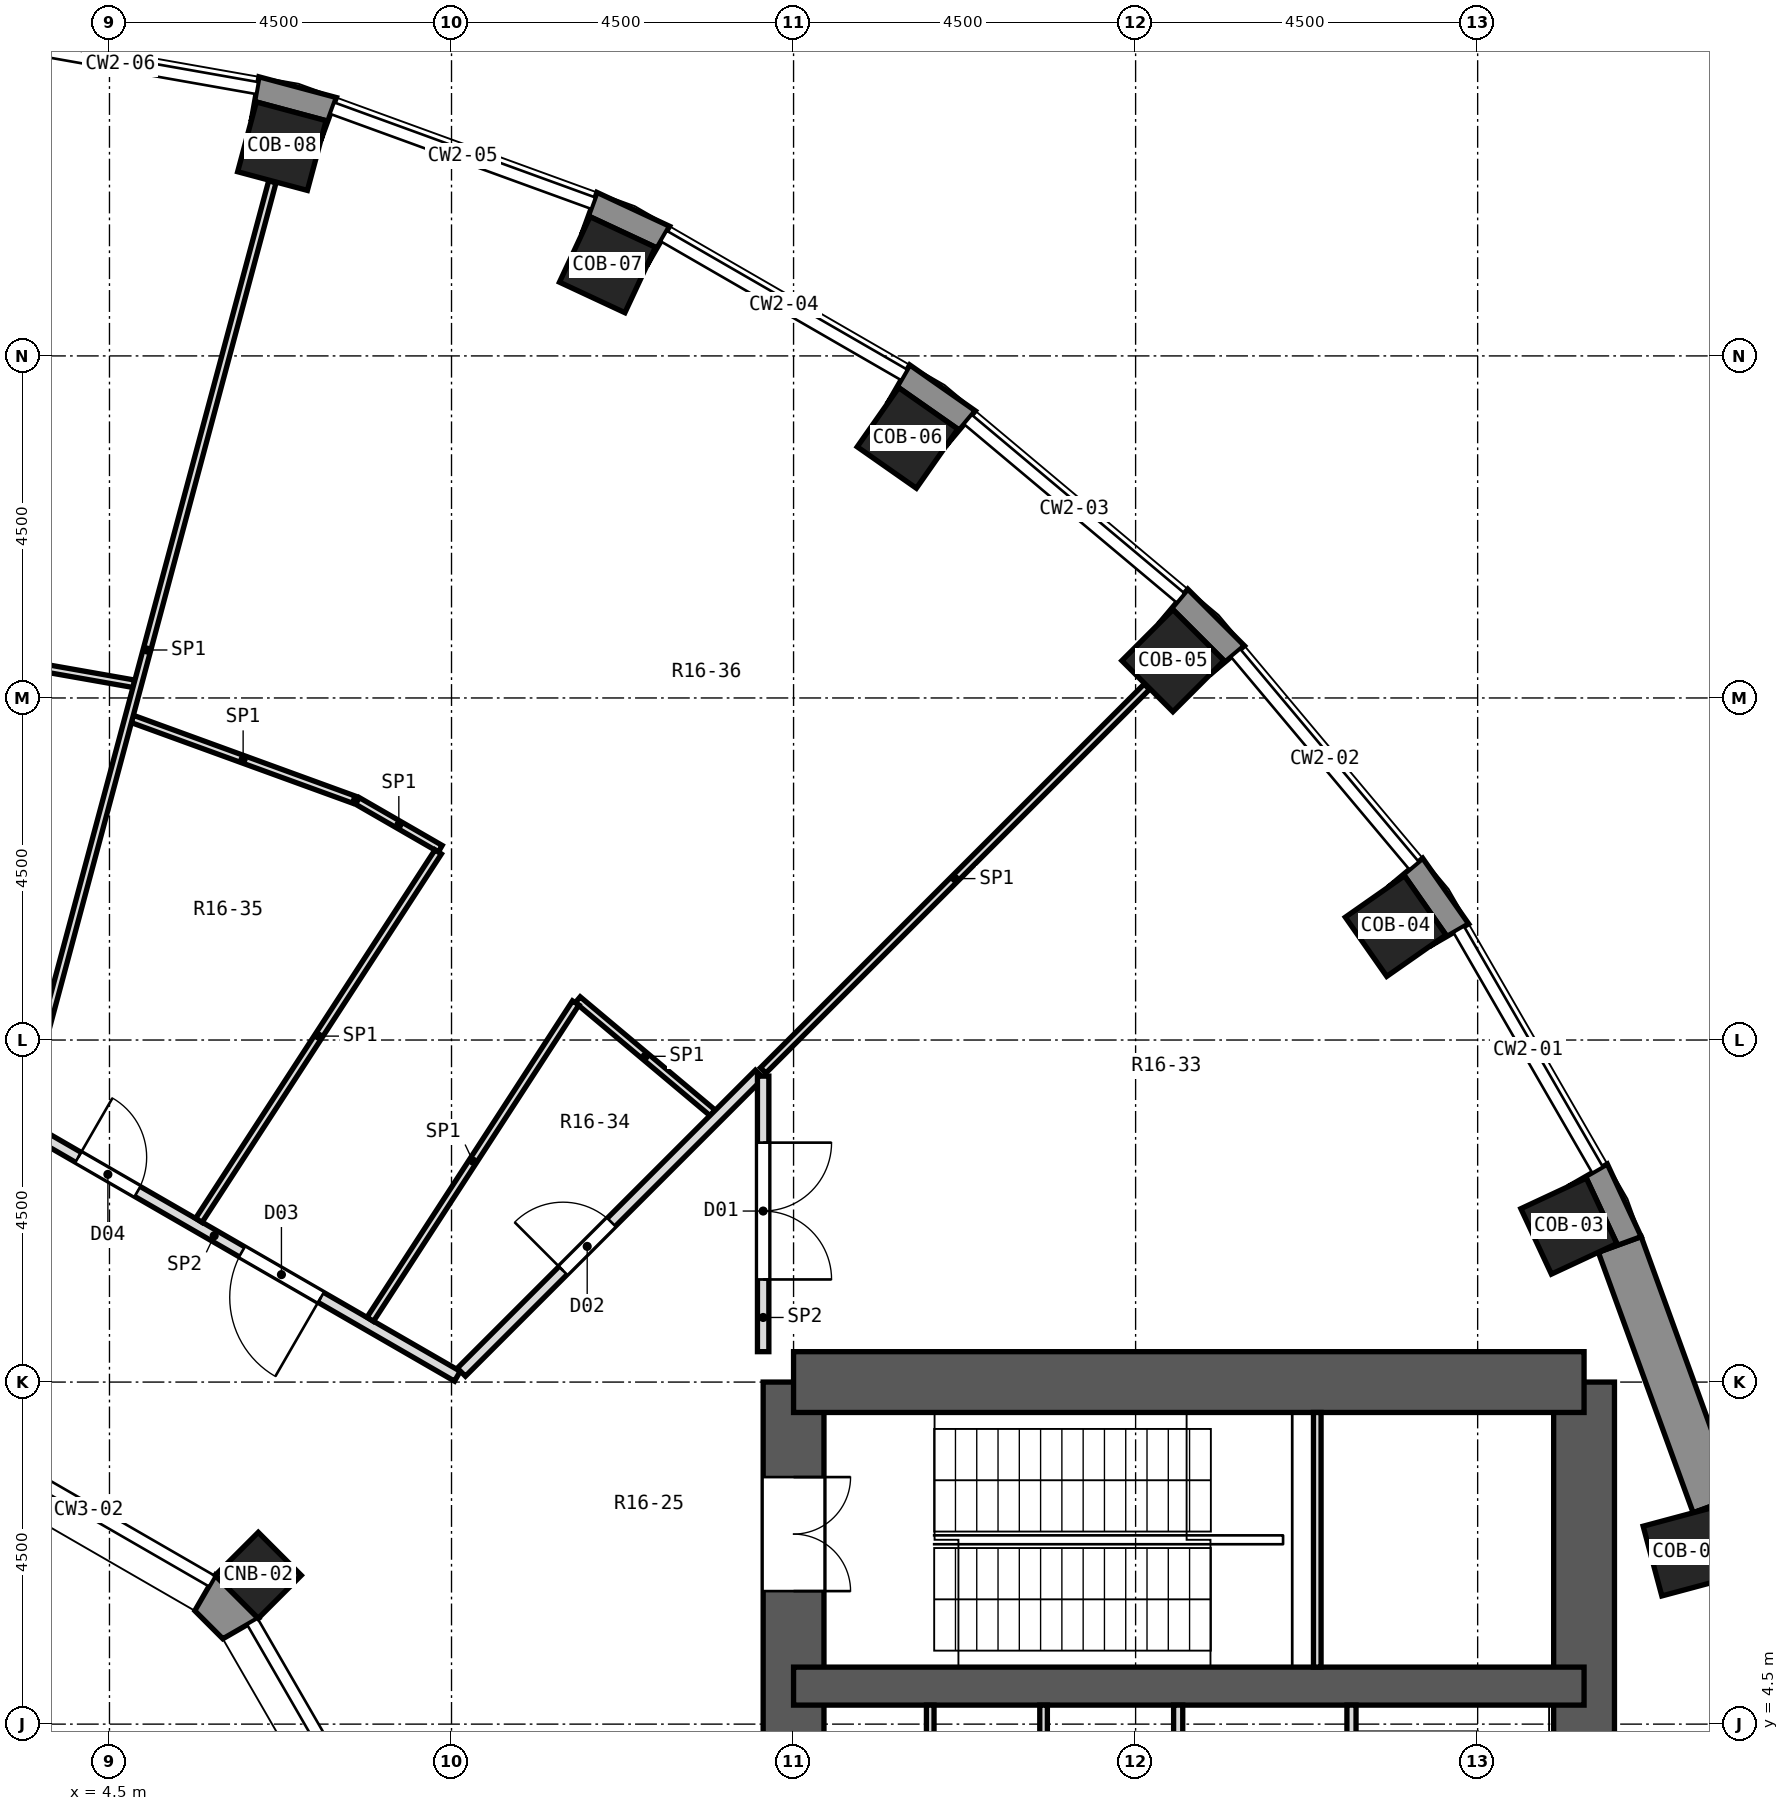
"""IFC4 building model, lengths in metres.
Left out: names, types, materials, properties, quantities, classifications, styles, units other than length and angle.
Written with IfcOpenShell. Run it as: python <this file> out.ifc"""

import sys

from ifc_helpers import new_model, si_unit, direction, frame, frame_2d, origin, origin_2d, place, context, subcontext, project, spatial, polyline, rectangle, outline, extrude, element, fill, save


model = new_model("IFC4")
c1 = context("Model", 3, precision=1e-05, world=origin(), true_north=direction((0.0, 1.0)))
c2 = subcontext(c1, "Body", "Model", "MODEL_VIEW")
j1 = project(units=[si_unit("LENGTHUNIT", "METRE"), si_unit("PLANEANGLEUNIT", "RADIAN")], contexts=[c1])
p1 = place(None, origin())
s1 = spatial("IfcSite", under=j1, at=p1, CompositionType="ELEMENT")
p2 = place(p1, origin())
s2 = spatial("IfcBuilding", under=s1, at=p2, CompositionType="ELEMENT")
p3 = place(p2, frame((0.0, 0.0, 86.9)))
s3 = spatial("IfcBuildingStorey", under=s2, at=p3, CompositionType="ELEMENT", Elevation=86.9)
for number, where, z_axis, x_axis in (
    (1, (25.259, 6.768, -0.55), (0.0, 0.0, 1.0), (0.966, 0.259, 0.0)),
    (2, (23.7, 11.052, -0.55), (0.0, 0.0, 1.0), (0.906, 0.423, 0.0)),
    (3, (21.421, 14.999, -0.55), (0.0, 0.0, 1.0), (0.819, 0.574, 0.0)),
    (4, (18.491, 18.491, -0.55), (0.0, 0.0, 1.0), (0.707, 0.707, 0.0)),
    (5, (14.999, 21.421, -0.55), (0.0, 0.0, 1.0), (0.574, 0.819, 0.0)),
    (6, (11.052, 23.7, -0.55), (0.0, 0.0, 1.0), (0.423, 0.906, 0.0)),
    (7, (6.768, 25.259, -0.55), (0.0, 0.0, 1.0), (0.259, 0.966, 0.0)),
):
    element("IfcColumn", number, at=place(p3, frame(where, z_axis=z_axis, x_axis=x_axis)), inside=s3, PredefinedType="COLUMN", context=c2, shape_type="SweptSolid", body=[
        extrude(rectangle(XDim=0.95, YDim=0.95, at=origin_2d()), origin(), (0.0, 0.0, 1.0), 5.55),
    ])
p4 = place(p3, frame((6.458, 6.458, 0.0), z_axis=(0.0, 0.0, 1.0), x_axis=(0.707106781187, 0.707106781187, 0.0)))
e8 = element("IfcColumn", 8, at=p4, inside=s3, PredefinedType="COLUMN", context=c2, shape_type="SweptSolid", body=[
    extrude(rectangle(XDim=0.8, YDim=0.8, at=origin_2d()), origin(), (0.0, 0.0, 1.0), 5.0),
])
p5 = place(p3, frame((13.5, -9.0, 0.0), z_axis=(0.0, 0.0, 1.0), x_axis=(0.0, 1.0, 0.0)))
e9 = element("IfcWall", 9, at=p5, inside=s3, PredefinedType="SHEAR", context=c2, shape_type="SweptSolid", body=[
    extrude(rectangle(XDim=18.0, YDim=0.8, at=frame_2d((9.0, 0.0))), origin(), (0.0, 0.0, 1.0), 5.0),
])
p6 = place(p5, frame((15.25, 0.0, 0.0)))
e10 = element("IfcOpeningElement", 10, at=p6, cuts=e9, PredefinedType="OPENING", context=c2, shape_type="SweptSolid", body=[
    extrude(rectangle(XDim=1.5, YDim=2.1, at=frame_2d((0.75, 1.05))), frame((0.0, 0.412, 0.0), z_axis=(0.0, -1.0, 0.0), x_axis=(1.0, 0.0, 0.0)), (0.0, 0.0, 1.0), 0.824),
])
p7 = place(p5, frame((1.25, 0.0, 0.0)))
e11 = element("IfcOpeningElement", 11, at=p7, cuts=e9, PredefinedType="OPENING", context=c2, shape_type="SweptSolid", body=[
    extrude(rectangle(XDim=1.5, YDim=2.1, at=frame_2d((0.75, 1.05))), frame((0.0, 0.412, 0.0), z_axis=(0.0, -1.0, 0.0), x_axis=(1.0, 0.0, 0.0)), (0.0, 0.0, 1.0), 0.824),
])
p8 = place(p5, frame((7.5, 0.0, 0.0)))
e12 = element("IfcOpeningElement", 12, at=p8, cuts=e9, PredefinedType="OPENING", context=c2, shape_type="SweptSolid", body=[
    extrude(rectangle(XDim=3.0, YDim=2.4, at=frame_2d((1.5, 1.2))), frame((0.0, 0.412, 0.0), z_axis=(0.0, -1.0, 0.0), x_axis=(1.0, 0.0, 0.0)), (0.0, 0.0, 1.0), 0.824),
])
p9 = place(p3, frame((23.9, -9.0, 0.0), z_axis=(0.0, 0.0, 1.0), x_axis=(0.0, 1.0, 0.0)))
e13 = element("IfcWall", 13, at=p9, inside=s3, PredefinedType="SHEAR", context=c2, shape_type="SweptSolid", body=[
    extrude(rectangle(XDim=18.0, YDim=0.8, at=frame_2d((9.0, 0.0))), origin(), (0.0, 0.0, 1.0), 5.0),
])
p10 = place(p3, frame((13.5, 9.0, 0.0), z_axis=(0.0, 0.0, 1.0), x_axis=(1.0, 0.0, 0.0)))
e14 = element("IfcWall", 14, at=p10, inside=s3, PredefinedType="SHEAR", context=c2, shape_type="SweptSolid", body=[
    extrude(rectangle(XDim=10.4, YDim=0.8, at=frame_2d((5.2, 0.0))), origin(), (0.0, 0.0, 1.0), 5.0),
])
p11 = place(p3, frame((13.5, 5.0, 0.0), z_axis=(0.0, 0.0, 1.0), x_axis=(1.0, 0.0, 0.0)))
e15 = element("IfcWall", 15, at=p11, inside=s3, PredefinedType="SHEAR", context=c2, shape_type="SweptSolid", body=[
    extrude(rectangle(XDim=10.4, YDim=0.5, at=frame_2d((5.2, 0.0))), origin(), (0.0, 0.0, 1.0), 5.0),
])
p12 = place(p3, frame((25.617, 7.383, 0.0), z_axis=(0.0, 0.0, 1.0), x_axis=(-0.341990236633, 0.939703505393, 0.0)))
e16 = element("IfcWall", 16, at=p12, inside=s3, PredefinedType="SOLIDWALL", context=c2, shape_type="SweptSolid", body=[
    extrude(rectangle(XDim=3.648, YDim=0.6, at=frame_2d((1.824, 0.0))), origin(), (0.0, 0.0, 1.0), 4.5),
])
p13 = place(p3, origin())
e17 = element("IfcWall", 17, at=p13, inside=s3, PredefinedType="SOLIDWALL", context=c2, shape_type="SweptSolid", body=[
    extrude(outline(polyline([(26.172, 6.467), (25.899, 7.486), (25.335, 7.28), (25.595, 7.35), (25.841, 6.432), (25.581, 6.363), (26.172, 6.467)])), origin(), (0.0, 0.0, 1.0), 4.5),
])
p14 = place(p3, origin())
e18 = element("IfcWall", 18, at=p14, inside=s3, PredefinedType="SOLIDWALL", context=c2, shape_type="SweptSolid", body=[
    extrude(outline(polyline([(24.651, 10.913), (24.206, 11.869), (23.686, 11.569), (23.93, 11.683), (24.331, 10.822), (24.087, 10.708), (24.651, 10.913)])), origin(), (0.0, 0.0, 1.0), 4.5),
])
p15 = place(p3, origin())
e19 = element("IfcWall", 19, at=p15, inside=s3, PredefinedType="SOLIDWALL", context=c2, shape_type="SweptSolid", body=[
    extrude(outline(polyline([(21.777, 15.892), (21.317, 15.506), (21.538, 15.661), (22.083, 14.882), (21.862, 14.728), (22.382, 15.028), (21.777, 15.892)])), origin(), (0.0, 0.0, 1.0), 4.5),
])
p16 = place(p3, origin())
e20 = element("IfcWall", 20, at=p16, inside=s3, PredefinedType="SOLIDWALL", context=c2, shape_type="SweptSolid", body=[
    extrude(outline(polyline([(19.432, 18.686), (18.686, 19.432), (18.301, 18.972), (18.491, 19.163), (19.163, 18.491), (18.972, 18.301), (19.432, 18.686)])), origin(), (0.0, 0.0, 1.0), 4.5),
])
p17 = place(p3, origin())
e21 = element("IfcWall", 21, at=p17, inside=s3, PredefinedType="SOLIDWALL", context=c2, shape_type="SweptSolid", body=[
    extrude(outline(polyline([(15.028, 22.382), (14.728, 21.862), (14.882, 22.083), (15.661, 21.538), (15.506, 21.317), (15.892, 21.777), (15.028, 22.382)])), origin(), (0.0, 0.0, 1.0), 4.5),
])
p18 = place(p3, origin())
e22 = element("IfcWall", 22, at=p18, inside=s3, PredefinedType="SOLIDWALL", context=c2, shape_type="SweptSolid", body=[
    extrude(outline(polyline([(10.913, 24.651), (10.708, 24.087), (10.822, 24.331), (11.683, 23.93), (11.569, 23.686), (11.869, 24.206), (10.913, 24.651)])), origin(), (0.0, 0.0, 1.0), 4.5),
])
p19 = place(p3, origin())
e23 = element("IfcWall", 23, at=p19, inside=s3, PredefinedType="SOLIDWALL", context=c2, shape_type="SweptSolid", body=[
    extrude(outline(polyline([(7.486, 25.899), (6.467, 26.172), (6.363, 25.581), (6.432, 25.841), (7.35, 25.595), (7.28, 25.335), (7.486, 25.899)])), origin(), (0.0, 0.0, 1.0), 4.5),
])
p20 = place(p3, origin())
e24 = element("IfcWall", 24, at=p20, inside=s3, PredefinedType="SOLIDWALL", context=c2, shape_type="SweptSolid", body=[
    extrude(outline(polyline([(5.892, 6.458), (5.623, 5.991), (5.991, 5.623), (6.458, 5.892), (5.892, 6.458)])), origin(), (0.0, 0.0, 1.0), 4.5),
])
p21 = place(p3, frame((10.661, 14.03, 0.0), z_axis=(0.0, 0.0, 1.0), x_axis=(0.766117883764, -0.642700076378, 0.0)))
e25 = element("IfcWall", 25, at=p21, inside=s3, PredefinedType="PARTITIONING", context=c2, shape_type="SweptSolid", body=[
    extrude(rectangle(XDim=2.316, YDim=0.1, at=frame_2d((1.158, 0.0))), origin(), (0.0, 0.0, 1.0), 4.5),
])
p22 = place(p3, frame((3.323, 12.4, 0.0), z_axis=(0.0, 0.0, 1.0), x_axis=(0.865961614908, -0.500110469302, 0.0)))
e26 = element("IfcWall", 26, at=p22, inside=s3, PredefinedType="PARTITIONING", context=c2, shape_type="SweptSolid", body=[
    extrude(rectangle(XDim=6.645, YDim=0.15, at=frame_2d((3.322, 0.0))), origin(), (0.0, 0.0, 1.0), 4.5),
])
p23 = place(p22, frame((3.372, 0.0, 0.0)))
e27 = element("IfcOpeningElement", 27, at=p23, cuts=e26, PredefinedType="OPENING", context=c2, shape_type="SweptSolid", body=[
    extrude(rectangle(XDim=1.2, YDim=2.1, at=frame_2d((0.6, 1.05))), frame((0.0, 0.087, 0.0), z_axis=(0.0, -1.0, 0.0), x_axis=(1.0, 0.0, 0.0)), (0.0, 0.0, 1.0), 0.174),
])
p24 = place(p22, frame((0.885, 0.0, 0.0)))
e28 = element("IfcOpeningElement", 28, at=p24, cuts=e26, PredefinedType="OPENING", context=c2, shape_type="SweptSolid", body=[
    extrude(rectangle(XDim=0.9, YDim=2.1, at=frame_2d((0.45, 1.05))), frame((0.0, 0.087, 0.0), z_axis=(0.0, -1.0, 0.0), x_axis=(1.0, 0.0, 0.0)), (0.0, 0.0, 1.0), 0.174),
])
p25 = place(p3, frame((7.762, 16.646, 0.0), z_axis=(0.0, 0.0, 1.0), x_axis=(0.866182356389, -0.499728051525, 0.0)))
e29 = element("IfcWall", 29, at=p25, inside=s3, PredefinedType="PARTITIONING", context=c2, shape_type="SweptSolid", body=[
    extrude(rectangle(XDim=1.259, YDim=0.1, at=frame_2d((0.629, 0.0))), origin(), (0.0, 0.0, 1.0), 4.5),
])
p26 = place(p3, frame((4.801, 17.724, 0.0), z_axis=(0.0, 0.0, 1.0), x_axis=(0.939676140835, -0.342065418225, 0.0)))
e30 = element("IfcWall", 30, at=p26, inside=s3, PredefinedType="PARTITIONING", context=c2, shape_type="SweptSolid", body=[
    extrude(rectangle(XDim=3.101, YDim=0.1, at=frame_2d((1.551, 0.0))), origin(), (0.0, 0.0, 1.0), 4.5),
])
p27 = place(p3, frame((1.64, 18.747, 0.0), z_axis=(0.0, 0.0, 1.0), x_axis=(0.984847393416, -0.173423215521, 0.0)))
e31 = element("IfcWall", 31, at=p27, inside=s3, PredefinedType="PARTITIONING", context=c2, shape_type="SweptSolid", body=[
    extrude(rectangle(XDim=3.231, YDim=0.1, at=frame_2d((1.615, 0.0))), origin(), (0.0, 0.0, 1.0), 4.5),
])
p28 = place(p3, frame((13.1, 13.1, 0.0), z_axis=(0.0, 0.0, 1.0), x_axis=(0.707106781187, 0.707106781187, 0.0)))
e32 = element("IfcWall", 32, at=p28, inside=s3, PredefinedType="PARTITIONING", context=c2, shape_type="SweptSolid", body=[
    extrude(rectangle(XDim=7.139, YDim=0.1, at=frame_2d((3.569, 0.0))), origin(), (0.0, 0.0, 1.0), 4.5),
])
p29 = place(p3, frame((9.13, 9.13, 0.0), z_axis=(0.0, 0.0, 1.0), x_axis=(0.707106781187, 0.707106781187, 0.0)))
e33 = element("IfcWall", 33, at=p29, inside=s3, PredefinedType="PARTITIONING", context=c2, shape_type="SweptSolid", body=[
    extrude(rectangle(XDim=5.545, YDim=0.15, at=frame_2d((2.772, 0.0))), origin(), (0.0, 0.0, 1.0), 4.5),
])
p30 = place(p29, frame((1.89, 0.0, 0.0)))
e34 = element("IfcOpeningElement", 34, at=p30, cuts=e33, PredefinedType="OPENING", context=c2, shape_type="SweptSolid", body=[
    extrude(rectangle(XDim=0.9, YDim=2.1, at=frame_2d((0.45, 1.05))), frame((0.0, 0.087, 0.0), z_axis=(0.0, -1.0, 0.0), x_axis=(1.0, 0.0, 0.0)), (0.0, 0.0, 1.0), 0.174),
])
p31 = place(p3, frame((7.931, 9.826, 0.0), z_axis=(0.0, 0.0, 1.0), x_axis=(0.544635552354, 0.838672829602, 0.0)))
e35 = element("IfcWall", 35, at=p31, inside=s3, PredefinedType="PARTITIONING", context=c2, shape_type="SweptSolid", body=[
    extrude(rectangle(XDim=4.963, YDim=0.1, at=frame_2d((2.481, 0.0))), origin(), (0.0, 0.0, 1.0), 4.5),
])
p32 = place(p3, frame((5.676, 11.128, 0.0), z_axis=(0.0, 0.0, 1.0), x_axis=(0.544777517704, 0.838580619979, 0.0)))
e36 = element("IfcWall", 36, at=p32, inside=s3, PredefinedType="PARTITIONING", context=c2, shape_type="SweptSolid", body=[
    extrude(rectangle(XDim=5.78, YDim=0.1, at=frame_2d((2.89, 0.0))), origin(), (0.0, 0.0, 1.0), 4.5),
])
p33 = place(p3, frame((3.342, 12.472, 0.0), z_axis=(0.0, 0.0, 1.0), x_axis=(0.258799243674, 0.965931131848, 0.0)))
e37 = element("IfcWall", 37, at=p33, inside=s3, PredefinedType="PARTITIONING", context=c2, shape_type="SweptSolid", body=[
    extrude(rectangle(XDim=12.752, YDim=0.1, at=frame_2d((6.376, 0.0))), origin(), (0.0, 0.0, 1.0), 4.5),
])
p34 = place(p3, frame((13.1, 9.4, 0.0), z_axis=(0.0, 0.0, 1.0), x_axis=(0.0, 1.0, 0.0)))
e38 = element("IfcWall", 38, at=p34, inside=s3, PredefinedType="PARTITIONING", context=c2, shape_type="SweptSolid", body=[
    extrude(rectangle(XDim=3.625, YDim=0.15, at=frame_2d((1.812, 0.0))), origin(), (0.0, 0.0, 1.0), 4.5),
])
p35 = place(p34, frame((0.95, 0.0, 0.0)))
e39 = element("IfcOpeningElement", 39, at=p35, cuts=e38, PredefinedType="OPENING", context=c2, shape_type="SweptSolid", body=[
    extrude(rectangle(XDim=1.8, YDim=2.1, at=frame_2d((0.9, 1.05))), frame((0.0, 0.087, 0.0), z_axis=(0.0, -1.0, 0.0), x_axis=(1.0, 0.0, 0.0)), (0.0, 0.0, 1.0), 0.174),
])
for number, where, z_axis, x_axis in (
    (40, (15.298, 2.25, 0.0), (0.0, 0.0, 1.0), (0.0, 1.0, 0.0)),
    (41, (16.789, 2.25, 0.0), (0.0, 0.0, 1.0), (0.0, 1.0, 0.0)),
):
    element("IfcWall", number, at=place(p3, frame(where, z_axis=z_axis, x_axis=x_axis)), inside=s3, PredefinedType="PARTITIONING", context=c2, shape_type="SweptSolid", body=[
        extrude(rectangle(XDim=2.5, YDim=0.1, at=frame_2d((1.25, 0.0))), origin(), (0.0, 0.0, 1.0), 4.5),
    ])
for number, where, z_axis, x_axis in (
    (42, (18.56, 2.25, 0.0), (0.0, 0.0, 1.0), (0.0, 1.0, 0.0)),
    (43, (20.84, 2.25, 0.0), (0.0, 0.0, 1.0), (0.0, 1.0, 0.0)),
):
    element("IfcWall", number, at=place(p3, frame(where, z_axis=z_axis, x_axis=x_axis)), inside=s3, PredefinedType="PARTITIONING", context=c2, shape_type="SweptSolid", body=[
        extrude(rectangle(XDim=2.5, YDim=0.12, at=frame_2d((1.25, 0.0))), origin(), (0.0, 0.0, 1.0), 4.5),
    ])
p36 = place(p3, frame((20.39, 5.25, 0.0), z_axis=(0.0, 0.0, 1.0), x_axis=(0.0, 1.0, 0.0)))
e44 = element("IfcWall", 44, at=p36, inside=s3, PredefinedType="PARTITIONING", context=c2, shape_type="SweptSolid", body=[
    extrude(rectangle(XDim=3.35, YDim=0.1, at=frame_2d((1.675, 0.0))), origin(), (0.0, 0.0, 1.0), 4.5),
])
p37 = place(p35, frame((1.8, 0.0, 0.0), z_axis=(0.0, 0.0, 1.0), x_axis=(-1.0, 0.0, 0.0)))
e45 = element("IfcDoor", 45, at=p37, inside=s3, OperationType="DOUBLE_DOOR_SINGLE_SWING", PredefinedType="DOOR", context=c2, shape_type="SweptSolid", body=[
    extrude(rectangle(XDim=1.8, YDim=2.1, at=frame_2d((0.9, 1.05))), frame((0.0, 0.025, 0.0), z_axis=(0.0, -1.0, 0.0), x_axis=(1.0, 0.0, 0.0)), (0.0, 0.0, 1.0), 0.05),
])
fill(e39, e45)
p38 = place(p30, origin())
e46 = element("IfcDoor", 46, at=p38, inside=s3, OperationType="SINGLE_SWING_LEFT", PredefinedType="DOOR", context=c2, shape_type="SweptSolid", body=[
    extrude(rectangle(XDim=0.9, YDim=2.1, at=frame_2d((0.45, 1.05))), frame((0.0, 0.025, 0.0), z_axis=(0.0, -1.0, 0.0), x_axis=(1.0, 0.0, 0.0)), (0.0, 0.0, 1.0), 0.05),
])
fill(e34, e46)
p39 = place(p23, frame((1.2, 0.0, 0.0), z_axis=(0.0, 0.0, 1.0), x_axis=(-1.0, 0.0, 0.0)))
e47 = element("IfcDoor", 47, at=p39, inside=s3, OperationType="SINGLE_SWING_LEFT", PredefinedType="DOOR", context=c2, shape_type="SweptSolid", body=[
    extrude(rectangle(XDim=1.2, YDim=2.1, at=frame_2d((0.6, 1.05))), frame((0.0, 0.025, 0.0), z_axis=(0.0, -1.0, 0.0), x_axis=(1.0, 0.0, 0.0)), (0.0, 0.0, 1.0), 0.05),
])
fill(e27, e47)
p40 = place(p24, origin())
e48 = element("IfcDoor", 48, at=p40, inside=s3, OperationType="SINGLE_SWING_LEFT", PredefinedType="DOOR", context=c2, shape_type="SweptSolid", body=[
    extrude(rectangle(XDim=0.9, YDim=2.1, at=frame_2d((0.45, 1.05))), frame((0.0, 0.025, 0.0), z_axis=(0.0, -1.0, 0.0), x_axis=(1.0, 0.0, 0.0)), (0.0, 0.0, 1.0), 0.05),
])
fill(e28, e48)
p41 = place(p6, frame((1.5, 0.0, 0.0), z_axis=(0.0, 0.0, 1.0), x_axis=(-1.0, 0.0, 0.0)))
e49 = element("IfcDoor", 49, at=p41, inside=s3, OperationType="DOUBLE_DOOR_SINGLE_SWING", PredefinedType="DOOR", context=c2, shape_type="SweptSolid", body=[
    extrude(rectangle(XDim=1.5, YDim=2.1, at=frame_2d((0.75, 1.05))), frame((0.0, 0.025, 0.0), z_axis=(0.0, -1.0, 0.0), x_axis=(1.0, 0.0, 0.0)), (0.0, 0.0, 1.0), 0.05),
])
fill(e10, e49)
save(model, sys.argv[1])
